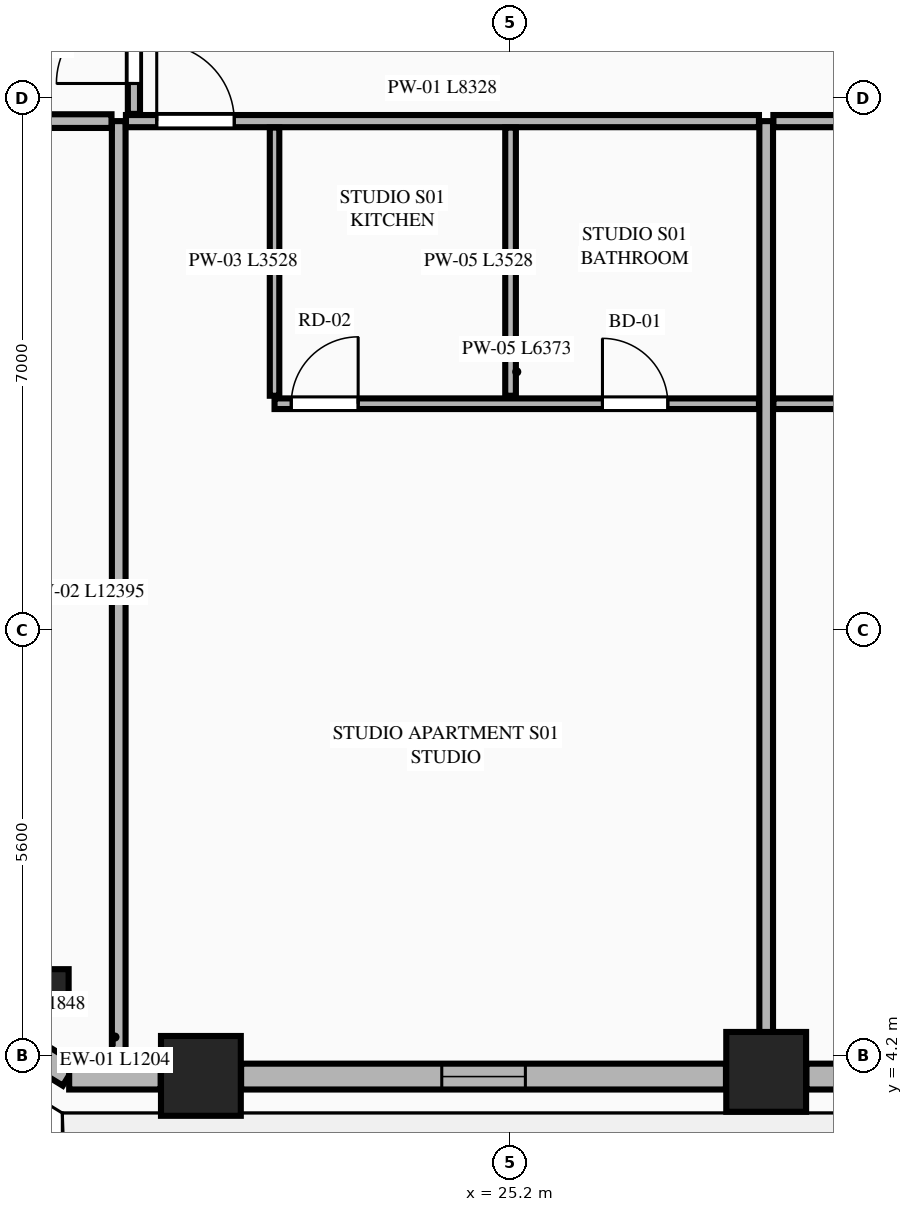
"""IFC4 building model, lengths in metres.
Left out: names, types, materials, properties, quantities, classifications, styles, units other than length and angle.
Written with IfcOpenShell. Run it as: python <this file> out.ifc"""

import sys

from ifc_helpers import new_model, si_unit, direction, frame, frame_2d, origin, origin_2d, place, context, subcontext, project, spatial, rectangle, extrude, element, fill, save


model = new_model("IFC4")
c1 = context("Model", 3, precision=1e-05, world=origin(), true_north=direction((0.0, 1.0)))
c2 = subcontext(c1, "Body", "Model", "MODEL_VIEW")
j1 = project(units=[si_unit("LENGTHUNIT", "METRE"), si_unit("PLANEANGLEUNIT", "RADIAN")], contexts=[c1])
p1 = place(None, origin())
s1 = spatial("IfcSite", under=j1, at=p1, CompositionType="ELEMENT")
p2 = place(p1, origin())
s2 = spatial("IfcBuilding", under=s1, at=p2, CompositionType="ELEMENT")
p3 = place(p2, frame((0.0, 0.0, 133.9)))
s3 = spatial("IfcBuildingStorey", under=s2, at=p3, CompositionType="ELEMENT", Elevation=133.9)
for number, where, z_axis, x_axis in (
    (1, (21.131, 3.939, 0.0), (0.0, 0.0, 1.0), (1.0, 0.0, 0.0)),
    (2, (28.568, 3.992, 0.0), (0.0, 0.0, 1.0), (1.0, 0.0, 0.0)),
):
    element("IfcColumn", number, at=place(p3, frame(where, z_axis=z_axis, x_axis=x_axis)), inside=s3, PredefinedType="COLUMN", context=c2, shape_type="SweptSolid", body=[
        extrude(rectangle(XDim=1.05, YDim=1.05, at=origin_2d()), origin(), (0.0, 0.0, 1.0), 3.55),
    ])
p4 = place(p3, frame((19.141, 5.093, 0.0), z_axis=(0.0, 0.0, 1.0), x_axis=(0.865160173452, -0.501495637342, 0.0)))
e3 = element("IfcColumn", 3, at=p4, inside=s3, PredefinedType="PILASTER", context=c2, shape_type="SweptSolid", body=[
    extrude(rectangle(XDim=0.5, YDim=0.35, at=origin_2d()), origin(), (0.0, 0.0, 1.0), 3.55),
])
p5 = place(p3, frame((17.829, 4.923, 0.0), z_axis=(0.0, 0.0, 1.0), x_axis=(0.851798915137, -0.523868884523, 0.0)))
e4 = element("IfcWall", 4, at=p5, inside=s3, PredefinedType="STANDARD", context=c2, shape_type="SweptSolid", body=[
    extrude(rectangle(XDim=1.848, YDim=0.34, at=frame_2d((0.924, 0.0))), origin(), (0.0, 0.0, 1.0), 3.34),
])
p6 = place(p3, frame((19.398, 3.93, 0.0), z_axis=(0.0, 0.0, 1.0), x_axis=(1.0, 0.0, 0.0)))
e5 = element("IfcWall", 5, at=p6, inside=s3, PredefinedType="STANDARD", context=c2, shape_type="SweptSolid", body=[
    extrude(rectangle(XDim=1.204, YDim=0.34, at=frame_2d((0.602, 0.0))), origin(), (0.0, 0.0, 1.0), 3.34),
])
p7 = place(p3, frame((21.66, 3.93, 0.0), z_axis=(0.0, 0.0, 1.0), x_axis=(1.0, 0.0, 0.0)))
e6 = element("IfcWall", 6, at=p7, inside=s3, PredefinedType="STANDARD", context=c2, shape_type="SweptSolid", body=[
    extrude(rectangle(XDim=6.379, YDim=0.34, at=frame_2d((3.189, 0.0))), origin(), (0.0, 0.0, 1.0), 2.797),
])
p8 = place(p7, frame((2.64, 0.0, 0.75)))
e7 = element("IfcOpeningElement", 7, at=p8, cuts=e6, PredefinedType="OPENING", context=c2, shape_type="SweptSolid", body=[
    extrude(rectangle(XDim=1.1, YDim=1.897, at=frame_2d((0.55, 0.948))), frame((0.0, 0.18, 0.0), z_axis=(0.0, -1.0, 0.0), x_axis=(1.0, 0.0, 0.0)), (0.0, 0.0, 1.0), 0.36),
])
p9 = place(p3, frame((29.097, 3.93, 0.0), z_axis=(0.0, 0.0, 1.0), x_axis=(1.0, 0.0, 0.0)))
e8 = element("IfcWall", 8, at=p9, inside=s3, PredefinedType="STANDARD", context=c2, shape_type="SweptSolid", body=[
    extrude(rectangle(XDim=6.606, YDim=0.34, at=frame_2d((3.303, 0.0))), origin(), (0.0, 0.0, 1.0), 2.797),
])
p10 = place(p9, frame((1.775, 0.0, 0.0)))
e9 = element("IfcOpeningElement", 9, at=p10, cuts=e8, PredefinedType="OPENING", context=c2, shape_type="SweptSolid", body=[
    extrude(rectangle(XDim=1.1, YDim=2.25, at=frame_2d((0.55, 1.125))), frame((0.0, 0.18, 0.0), z_axis=(0.0, -1.0, 0.0), x_axis=(1.0, 0.0, 0.0)), (0.0, 0.0, 1.0), 0.36),
])
p11 = place(p9, frame((5.186, 0.0, 0.75)))
e10 = element("IfcOpeningElement", 10, at=p11, cuts=e8, PredefinedType="OPENING", context=c2, shape_type="SweptSolid", body=[
    extrude(rectangle(XDim=1.1, YDim=1.897, at=frame_2d((0.55, 0.948))), frame((0.0, 0.18, 0.0), z_axis=(0.0, -1.0, 0.0), x_axis=(1.0, 0.0, 0.0)), (0.0, 0.0, 1.0), 0.36),
])
p12 = place(p3, frame((20.05, 4.105, 0.0), z_axis=(0.0, 0.0, 1.0), x_axis=(0.0, 1.0, 0.0)))
e11 = element("IfcWall", 11, at=p12, inside=s3, PredefinedType="PARTITIONING", context=c2, shape_type="SweptSolid", body=[
    extrude(rectangle(XDim=12.395, YDim=0.18, at=frame_2d((6.198, 0.0))), origin(), (0.0, 0.0, 1.0), 3.34),
])
p13 = place(p3, frame((28.568, 4.105, 0.0), z_axis=(0.0, 0.0, 1.0), x_axis=(0.0, 1.0, 0.0)))
e12 = element("IfcWall", 12, at=p13, inside=s3, PredefinedType="PARTITIONING", context=c2, shape_type="SweptSolid", body=[
    extrude(rectangle(XDim=12.395, YDim=0.18, at=frame_2d((6.198, 0.0))), origin(), (0.0, 0.0, 1.0), 2.722),
])
p14 = place(p3, frame((20.145, 16.5, 0.0), z_axis=(0.0, 0.0, 1.0), x_axis=(1.0, 0.0, 0.0)))
e13 = element("IfcWall", 13, at=p14, inside=s3, PredefinedType="PARTITIONING", context=c2, shape_type="SweptSolid", body=[
    extrude(rectangle(XDim=8.328, YDim=0.16, at=frame_2d((4.164, 0.0))), origin(), (0.0, 0.0, 1.0), 3.34),
])
p15 = place(p14, frame((0.405, 0.0, 0.0)))
e14 = element("IfcOpeningElement", 14, at=p15, cuts=e13, PredefinedType="OPENING", context=c2, shape_type="SweptSolid", body=[
    extrude(rectangle(XDim=1.02, YDim=2.25, at=frame_2d((0.51, 1.125))), frame((0.0, 0.09, 0.0), z_axis=(0.0, -1.0, 0.0), x_axis=(1.0, 0.0, 0.0)), (0.0, 0.0, 1.0), 0.18),
])
p16 = place(p3, frame((22.1, 12.887, 0.0), z_axis=(0.0, 0.0, 1.0), x_axis=(0.0, 1.0, 0.0)))
e15 = element("IfcWall", 15, at=p16, inside=s3, PredefinedType="PARTITIONING", context=c2, shape_type="SweptSolid", body=[
    extrude(rectangle(XDim=3.528, YDim=0.125, at=frame_2d((1.764, 0.0))), origin(), (0.0, 0.0, 1.0), 2.722),
])
p17 = place(p3, frame((22.1, 12.782, 0.0), z_axis=(0.0, 0.0, 1.0), x_axis=(1.0, 0.0, 0.0)))
e16 = element("IfcWall", 16, at=p17, inside=s3, PredefinedType="PLUMBINGWALL", context=c2, shape_type="SweptSolid", body=[
    extrude(rectangle(XDim=6.373, YDim=0.14, at=frame_2d((3.187, 0.0))), origin(), (0.0, 0.0, 1.0), 3.34),
])
p18 = place(p17, frame((4.314, 0.0, 0.0)))
e17 = element("IfcOpeningElement", 17, at=p18, cuts=e16, PredefinedType="OPENING", context=c2, shape_type="SweptSolid", body=[
    extrude(rectangle(XDim=0.86, YDim=2.1, at=frame_2d((0.43, 1.05))), frame((0.0, 0.08, 0.0), z_axis=(0.0, -1.0, 0.0), x_axis=(1.0, 0.0, 0.0)), (0.0, 0.0, 1.0), 0.16),
])
p19 = place(p17, frame((0.22, 0.0, 0.0)))
e18 = element("IfcOpeningElement", 18, at=p19, cuts=e16, PredefinedType="OPENING", context=c2, shape_type="SweptSolid", body=[
    extrude(rectangle(XDim=0.88, YDim=2.15, at=frame_2d((0.44, 1.075))), frame((0.0, 0.08, 0.0), z_axis=(0.0, -1.0, 0.0), x_axis=(1.0, 0.0, 0.0)), (0.0, 0.0, 1.0), 0.16),
])
p20 = place(p3, frame((25.205, 12.887, 0.0), z_axis=(0.0, 0.0, 1.0), x_axis=(0.0, 1.0, 0.0)))
e19 = element("IfcWall", 19, at=p20, inside=s3, PredefinedType="PLUMBINGWALL", context=c2, shape_type="SweptSolid", body=[
    extrude(rectangle(XDim=3.528, YDim=0.14, at=frame_2d((1.764, 0.0))), origin(), (0.0, 0.0, 1.0), 3.34),
])
p21 = place(p3, frame((28.663, 16.5, 0.0), z_axis=(0.0, 0.0, 1.0), x_axis=(1.0, 0.0, 0.0)))
e20 = element("IfcWall", 20, at=p21, inside=s3, PredefinedType="PARTITIONING", context=c2, shape_type="SweptSolid", body=[
    extrude(rectangle(XDim=15.992, YDim=0.16, at=frame_2d((7.996, 0.0))), origin(), (0.0, 0.0, 1.0), 3.34),
])
p22 = place(p21, frame((14.087, 0.0, 0.0)))
e21 = element("IfcOpeningElement", 21, at=p22, cuts=e20, PredefinedType="OPENING", context=c2, shape_type="SweptSolid", body=[
    extrude(rectangle(XDim=1.02, YDim=2.25, at=frame_2d((0.51, 1.125))), frame((0.0, 0.09, 0.0), z_axis=(0.0, -1.0, 0.0), x_axis=(1.0, 0.0, 0.0)), (0.0, 0.0, 1.0), 0.18),
])
p23 = place(p3, frame((28.663, 12.782, 0.0), z_axis=(0.0, 0.0, 1.0), x_axis=(1.0, 0.0, 0.0)))
e22 = element("IfcWall", 22, at=p23, inside=s3, PredefinedType="PLUMBINGWALL", context=c2, shape_type="SweptSolid", body=[
    extrude(rectangle(XDim=5.112, YDim=0.14, at=frame_2d((2.556, 0.0))), origin(), (0.0, 0.0, 1.0), 3.34),
])
p24 = place(p23, frame((2.131, 0.0, 0.0)))
e23 = element("IfcOpeningElement", 23, at=p24, cuts=e22, PredefinedType="OPENING", context=c2, shape_type="SweptSolid", body=[
    extrude(rectangle(XDim=0.86, YDim=2.1, at=frame_2d((0.43, 1.05))), frame((0.0, 0.08, 0.0), z_axis=(0.0, -1.0, 0.0), x_axis=(1.0, 0.0, 0.0)), (0.0, 0.0, 1.0), 0.16),
])
p25 = place(p3, frame((12.185, 16.5, 0.0), z_axis=(0.0, 0.0, 1.0), x_axis=(1.0, 0.0, 0.0)))
e24 = element("IfcWall", 24, at=p25, inside=s3, PredefinedType="PARTITIONING", context=c2, shape_type="SweptSolid", body=[
    extrude(rectangle(XDim=7.77, YDim=0.18, at=frame_2d((3.885, 0.0))), origin(), (0.0, 0.0, 1.0), 3.34),
])
p26 = place(p3, frame((20.25, 16.595, 0.0), z_axis=(0.0, 0.0, 1.0), x_axis=(0.0, 1.0, 0.0)))
e25 = element("IfcWall", 25, at=p26, inside=s3, PredefinedType="PARTITIONING", context=c2, shape_type="SweptSolid", body=[
    extrude(rectangle(XDim=6.202, YDim=0.16, at=frame_2d((3.101, 0.0))), origin(), (0.0, 0.0, 1.0), 3.34),
])
p27 = place(p26, frame((0.4, 0.0, 0.0)))
e26 = element("IfcOpeningElement", 26, at=p27, cuts=e25, PredefinedType="OPENING", context=c2, shape_type="SweptSolid", body=[
    extrude(rectangle(XDim=1.02, YDim=2.25, at=frame_2d((0.51, 1.125))), frame((0.0, 0.09, 0.0), z_axis=(0.0, -1.0, 0.0), x_axis=(1.0, 0.0, 0.0)), (0.0, 0.0, 1.0), 0.18),
])
p28 = place(p8, origin())
e27 = element("IfcWindow", 27, at=p28, inside=s3, PartitioningType="SINGLE_PANEL", PredefinedType="WINDOW", context=c2, shape_type="SweptSolid", body=[
    extrude(rectangle(XDim=1.1, YDim=1.897, at=frame_2d((0.55, 0.948))), frame((0.0, 0.03, 0.0), z_axis=(0.0, -1.0, 0.0), x_axis=(1.0, 0.0, 0.0)), (0.0, 0.0, 1.0), 0.06),
])
fill(e7, e27)
p29 = place(p18, origin())
e28 = element("IfcDoor", 28, at=p29, inside=s3, OperationType="SINGLE_SWING_LEFT", PredefinedType="DOOR", context=c2, shape_type="SweptSolid", body=[
    extrude(rectangle(XDim=0.86, YDim=2.1, at=frame_2d((0.43, 1.05))), frame((0.0, 0.025, 0.0), z_axis=(0.0, -1.0, 0.0), x_axis=(1.0, 0.0, 0.0)), (0.0, 0.0, 1.0), 0.05),
])
fill(e17, e28)
p30 = place(p15, origin())
e29 = element("IfcDoor", 29, at=p30, inside=s3, OperationType="SINGLE_SWING_LEFT", PredefinedType="DOOR", context=c2, shape_type="SweptSolid", body=[
    extrude(rectangle(XDim=1.02, YDim=2.25, at=frame_2d((0.51, 1.125))), frame((0.0, 0.025, 0.0), z_axis=(0.0, -1.0, 0.0), x_axis=(1.0, 0.0, 0.0)), (0.0, 0.0, 1.0), 0.05),
])
fill(e14, e29)
p31 = place(p19, origin())
e30 = element("IfcDoor", 30, at=p31, inside=s3, OperationType="SINGLE_SWING_RIGHT", PredefinedType="DOOR", context=c2, shape_type="SweptSolid", body=[
    extrude(rectangle(XDim=0.88, YDim=2.15, at=frame_2d((0.44, 1.075))), frame((0.0, 0.025, 0.0), z_axis=(0.0, -1.0, 0.0), x_axis=(1.0, 0.0, 0.0)), (0.0, 0.0, 1.0), 0.05),
])
fill(e18, e30)
p32 = place(p27, origin())
e31 = element("IfcDoor", 31, at=p32, inside=s3, OperationType="SINGLE_SWING_LEFT", PredefinedType="DOOR", context=c2, shape_type="SweptSolid", body=[
    extrude(rectangle(XDim=1.02, YDim=2.25, at=frame_2d((0.51, 1.125))), frame((0.0, 0.025, 0.0), z_axis=(0.0, -1.0, 0.0), x_axis=(1.0, 0.0, 0.0)), (0.0, 0.0, 1.0), 0.05),
])
fill(e26, e31)
save(model, sys.argv[1])
